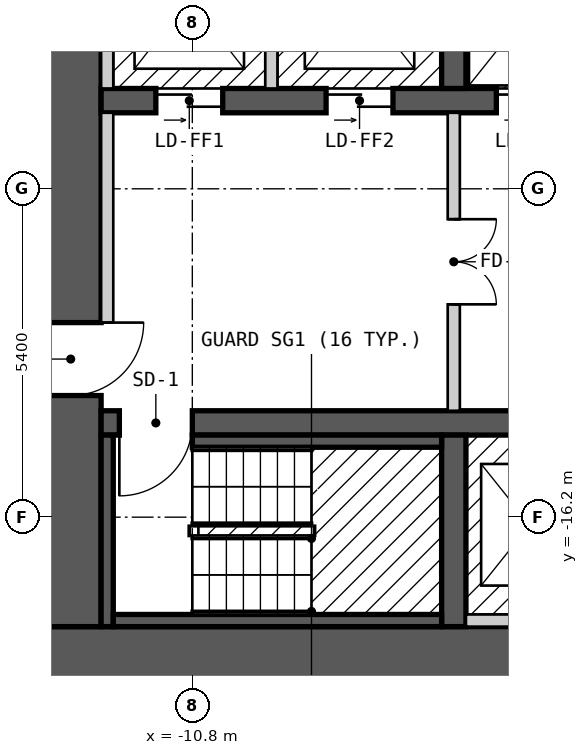
"""IFC4 building model, lengths in metres.
Left out: names, types, materials, properties, quantities, classifications, styles, units other than length and angle.
Written with IfcOpenShell. Run it as: python <this file> out.ifc"""

import sys

from ifc_helpers import new_model, si_unit, direction, frame, frame_2d, origin, place, context, subcontext, project, spatial, rectangle, extrude, element, fill, save


model = new_model("IFC4")
c1 = context("Model", 3, precision=1e-05, world=origin(), true_north=direction((0.0, 1.0)))
c2 = subcontext(c1, "Body", "Model", "MODEL_VIEW")
j1 = project(units=[si_unit("LENGTHUNIT", "METRE"), si_unit("PLANEANGLEUNIT", "RADIAN")], contexts=[c1])
p1 = place(None, origin())
s1 = spatial("IfcSite", under=j1, at=p1, CompositionType="ELEMENT")
p2 = place(p1, origin())
s2 = spatial("IfcBuilding", under=s1, at=p2, CompositionType="ELEMENT")
p3 = place(p2, frame((0.0, 0.0, 105.0)))
s3 = spatial("IfcBuildingStorey", under=s2, at=p3, CompositionType="ELEMENT", Elevation=105.0)
p4 = place(p3, frame((-13.3, -18.5, 0.0), z_axis=(0.0, 0.0, 1.0), x_axis=(1.0, 0.0, 0.0)))
e1 = element("IfcWall", 1, at=p4, inside=s3, PredefinedType="SHEAR", context=c2, shape_type="SweptSolid", body=[
    extrude(rectangle(XDim=26.6, YDim=1.0, at=frame_2d((13.3, 0.0))), origin(), (0.0, 0.0, 1.0), 2.6),
])
p5 = place(p3, frame((-12.8, -18.0, 0.0), z_axis=(0.0, 0.0, 1.0), x_axis=(0.0, 1.0, 0.0)))
e2 = element("IfcWall", 2, at=p5, inside=s3, PredefinedType="SHEAR", context=c2, shape_type="SweptSolid", body=[
    extrude(rectangle(XDim=12.0, YDim=1.0, at=frame_2d((6.0, 0.0))), origin(), (0.0, 0.0, 1.0), 2.6),
])
p6 = place(p5, frame((3.8, 0.0, 0.0)))
e3 = element("IfcOpeningElement", 3, at=p6, cuts=e2, PredefinedType="OPENING", context=c2, shape_type="SweptSolid", body=[
    extrude(rectangle(XDim=1.2, YDim=2.1, at=frame_2d((0.6, 1.05))), frame((0.0, 0.51, 0.0), z_axis=(0.0, -1.0, 0.0), x_axis=(1.0, 0.0, 0.0)), (0.0, 0.0, 1.0), 1.02),
])
p7 = place(p3, frame((-12.3, -14.65, 0.0), z_axis=(0.0, 0.0, 1.0), x_axis=(1.0, 0.0, 0.0)))
e4 = element("IfcWall", 4, at=p7, inside=s3, PredefinedType="SHEAR", context=c2, shape_type="SweptSolid", body=[
    extrude(rectangle(XDim=24.6, YDim=0.4, at=frame_2d((12.3, 0.0))), origin(), (0.0, 0.0, 1.0), 2.6),
])
p8 = place(p7, frame((1.5, 0.0, 0.0), z_axis=(0.0, 0.0, 1.0), x_axis=(-1.0, 0.0, 0.0)))
e5 = element("IfcOpeningElement", 5, at=p8, cuts=e4, PredefinedType="OPENING", context=c2, shape_type="SweptSolid", body=[
    extrude(rectangle(XDim=1.2, YDim=2.1, at=frame_2d((0.6, 1.05))), frame((0.0, 0.21, 0.0), z_axis=(0.0, -1.0, 0.0), x_axis=(1.0, 0.0, 0.0)), (0.0, 0.0, 1.0), 0.42),
])
p9 = place(p7, frame((24.35, 0.0, 0.0), z_axis=(0.0, 0.0, 1.0), x_axis=(-1.0, 0.0, 0.0)))
e6 = element("IfcOpeningElement", 6, at=p9, cuts=e4, PredefinedType="OPENING", context=c2, shape_type="SweptSolid", body=[
    extrude(rectangle(XDim=1.2, YDim=2.1, at=frame_2d((0.6, 1.05))), frame((0.0, 0.21, 0.0), z_axis=(0.0, -1.0, 0.0), x_axis=(1.0, 0.0, 0.0)), (0.0, 0.0, 1.0), 0.42),
])
p10 = place(p7, frame((17.4, 0.0, 0.0), z_axis=(0.0, 0.0, 1.0), x_axis=(-1.0, 0.0, 0.0)))
e7 = element("IfcOpeningElement", 7, at=p10, cuts=e4, PredefinedType="OPENING", context=c2, shape_type="SweptSolid", body=[
    extrude(rectangle(XDim=1.0, YDim=2.1, at=frame_2d((0.5, 1.05))), frame((0.0, 0.21, 0.0), z_axis=(0.0, -1.0, 0.0), x_axis=(1.0, 0.0, 0.0)), (0.0, 0.0, 1.0), 0.42),
])
p11 = place(p3, frame((-12.3, -9.35, 0.0), z_axis=(0.0, 0.0, 1.0), x_axis=(1.0, 0.0, 0.0)))
e8 = element("IfcWall", 8, at=p11, inside=s3, PredefinedType="SHEAR", context=c2, shape_type="SweptSolid", body=[
    extrude(rectangle(XDim=22.5, YDim=0.4, at=frame_2d((11.25, 0.0))), origin(), (0.0, 0.0, 1.0), 2.6),
])
p12 = place(p11, frame((0.9, 0.0, 0.0)))
e9 = element("IfcOpeningElement", 9, at=p12, cuts=e8, PredefinedType="OPENING", context=c2, shape_type="SweptSolid", body=[
    extrude(rectangle(XDim=1.1, YDim=2.1, at=frame_2d((0.55, 1.05))), frame((0.0, 0.21, 0.0), z_axis=(0.0, -1.0, 0.0), x_axis=(1.0, 0.0, 0.0)), (0.0, 0.0, 1.0), 0.42),
])
p13 = place(p11, frame((3.7, 0.0, 0.0)))
e10 = element("IfcOpeningElement", 10, at=p13, cuts=e8, PredefinedType="OPENING", context=c2, shape_type="SweptSolid", body=[
    extrude(rectangle(XDim=1.1, YDim=2.1, at=frame_2d((0.55, 1.05))), frame((0.0, 0.21, 0.0), z_axis=(0.0, -1.0, 0.0), x_axis=(1.0, 0.0, 0.0)), (0.0, 0.0, 1.0), 0.42),
])
p14 = place(p11, frame((6.5, 0.0, 0.0)))
e11 = element("IfcOpeningElement", 11, at=p14, cuts=e8, PredefinedType="OPENING", context=c2, shape_type="SweptSolid", body=[
    extrude(rectangle(XDim=1.1, YDim=2.1, at=frame_2d((0.55, 1.05))), frame((0.0, 0.21, 0.0), z_axis=(0.0, -1.0, 0.0), x_axis=(1.0, 0.0, 0.0)), (0.0, 0.0, 1.0), 0.42),
])
p15 = place(p11, frame((8.8, 0.0, 0.0)))
e12 = element("IfcOpeningElement", 12, at=p15, cuts=e8, PredefinedType="OPENING", context=c2, shape_type="SweptSolid", body=[
    extrude(rectangle(XDim=1.1, YDim=2.1, at=frame_2d((0.55, 1.05))), frame((0.0, 0.21, 0.0), z_axis=(0.0, -1.0, 0.0), x_axis=(1.0, 0.0, 0.0)), (0.0, 0.0, 1.0), 0.42),
])
p16 = place(p11, frame((11.1, 0.0, 0.0)))
e13 = element("IfcOpeningElement", 13, at=p16, cuts=e8, PredefinedType="OPENING", context=c2, shape_type="SweptSolid", body=[
    extrude(rectangle(XDim=1.1, YDim=2.1, at=frame_2d((0.55, 1.05))), frame((0.0, 0.21, 0.0), z_axis=(0.0, -1.0, 0.0), x_axis=(1.0, 0.0, 0.0)), (0.0, 0.0, 1.0), 0.42),
])
p17 = place(p11, frame((13.4, 0.0, 0.0)))
e14 = element("IfcOpeningElement", 14, at=p17, cuts=e8, PredefinedType="OPENING", context=c2, shape_type="SweptSolid", body=[
    extrude(rectangle(XDim=1.1, YDim=2.1, at=frame_2d((0.55, 1.05))), frame((0.0, 0.21, 0.0), z_axis=(0.0, -1.0, 0.0), x_axis=(1.0, 0.0, 0.0)), (0.0, 0.0, 1.0), 0.42),
])
p18 = place(p11, frame((15.7, 0.0, 0.0)))
e15 = element("IfcOpeningElement", 15, at=p18, cuts=e8, PredefinedType="OPENING", context=c2, shape_type="SweptSolid", body=[
    extrude(rectangle(XDim=1.1, YDim=2.1, at=frame_2d((0.55, 1.05))), frame((0.0, 0.21, 0.0), z_axis=(0.0, -1.0, 0.0), x_axis=(1.0, 0.0, 0.0)), (0.0, 0.0, 1.0), 0.42),
])
p19 = place(p11, frame((18.0, 0.0, 0.0)))
e16 = element("IfcOpeningElement", 16, at=p19, cuts=e8, PredefinedType="OPENING", context=c2, shape_type="SweptSolid", body=[
    extrude(rectangle(XDim=1.1, YDim=2.1, at=frame_2d((0.55, 1.05))), frame((0.0, 0.21, 0.0), z_axis=(0.0, -1.0, 0.0), x_axis=(1.0, 0.0, 0.0)), (0.0, 0.0, 1.0), 0.42),
])
p20 = place(p11, frame((20.4, 0.0, 0.0)))
e17 = element("IfcOpeningElement", 17, at=p20, cuts=e8, PredefinedType="OPENING", context=c2, shape_type="SweptSolid", body=[
    extrude(rectangle(XDim=1.1, YDim=2.1, at=frame_2d((0.55, 1.05))), frame((0.0, 0.21, 0.0), z_axis=(0.0, -1.0, 0.0), x_axis=(1.0, 0.0, 0.0)), (0.0, 0.0, 1.0), 0.42),
])
for number, where, z_axis, x_axis in (
    (18, (-6.5, -18.0, 0.0), (0.0, 0.0, 1.0), (0.0, 1.0, 0.0)),
    (19, (-6.5, -9.15, 0.0), (0.0, 0.0, 1.0), (0.0, 1.0, 0.0)),
):
    element("IfcWall", number, at=place(p3, frame(where, z_axis=z_axis, x_axis=x_axis)), inside=s3, PredefinedType="SHEAR", context=c2, shape_type="SweptSolid", body=[
        extrude(rectangle(XDim=3.15, YDim=0.4, at=frame_2d((1.575, 0.0))), origin(), (0.0, 0.0, 1.0), 2.6),
    ])
p21 = place(p3, frame((-12.2, -18.0, 0.0), z_axis=(0.0, 0.0, 1.0), x_axis=(0.0, 1.0, 0.0)))
e20 = element("IfcWall", 20, at=p21, inside=s3, PredefinedType="SOLIDWALL", context=c2, shape_type="SweptSolid", body=[
    extrude(rectangle(XDim=3.15, YDim=0.2, at=frame_2d((1.575, 0.0))), origin(), (0.0, 0.0, 1.0), 2.6),
])
p22 = place(p3, frame((-12.2, -13.0, 0.0), z_axis=(0.0, 0.0, 1.0), x_axis=(0.0, 1.0, 0.0)))
e21 = element("IfcWall", 21, at=p22, inside=s3, PredefinedType="PARTITIONING", context=c2, shape_type="SweptSolid", body=[
    extrude(rectangle(XDim=3.45, YDim=0.2, at=frame_2d((1.725, 0.0))), origin(), (0.0, 0.0, 1.0), 2.6),
])
p23 = place(p3, frame((-12.2, -9.15, 0.0), z_axis=(0.0, 0.0, 1.0), x_axis=(0.0, 1.0, 0.0)))
e22 = element("IfcWall", 22, at=p23, inside=s3, PredefinedType="SOLIDWALL", context=c2, shape_type="SweptSolid", body=[
    extrude(rectangle(XDim=3.15, YDim=0.2, at=frame_2d((1.575, 0.0))), origin(), (0.0, 0.0, 1.0), 2.6),
])
p24 = place(p3, frame((-12.1, -17.9, 0.0), z_axis=(0.0, 0.0, 1.0), x_axis=(1.0, 0.0, 0.0)))
e23 = element("IfcWall", 23, at=p24, inside=s3, PredefinedType="SOLIDWALL", context=c2, shape_type="SweptSolid", body=[
    extrude(rectangle(XDim=5.4, YDim=0.2, at=frame_2d((2.7, 0.0))), origin(), (0.0, 0.0, 1.0), 2.6),
])
p25 = place(p3, frame((-10.8, -14.95, 0.0), z_axis=(0.0, 0.0, 1.0), x_axis=(1.0, 0.0, 0.0)))
e24 = element("IfcWall", 24, at=p25, inside=s3, PredefinedType="SOLIDWALL", context=c2, shape_type="SweptSolid", body=[
    extrude(rectangle(XDim=4.1, YDim=0.2, at=frame_2d((2.05, 0.0))), origin(), (0.0, 0.0, 1.0), 2.6),
])
p26 = place(p3, frame((-9.5, -9.15, 0.0), z_axis=(0.0, 0.0, 1.0), x_axis=(0.0, 1.0, 0.0)))
e25 = element("IfcWall", 25, at=p26, inside=s3, PredefinedType="SOLIDWALL", context=c2, shape_type="SweptSolid", body=[
    extrude(rectangle(XDim=2.95, YDim=0.2, at=frame_2d((1.475, 0.0))), origin(), (0.0, 0.0, 1.0), 2.6),
])
p27 = place(p3, frame((-6.5, -14.45, 0.0), z_axis=(0.0, 0.0, 1.0), x_axis=(0.0, 1.0, 0.0)))
e26 = element("IfcWall", 26, at=p27, inside=s3, PredefinedType="PARTITIONING", context=c2, shape_type="SweptSolid", body=[
    extrude(rectangle(XDim=4.9, YDim=0.2, at=frame_2d((2.45, 0.0))), origin(), (0.0, 0.0, 1.0), 2.6),
])
p28 = place(p27, frame((3.15, 0.0, 0.0), z_axis=(0.0, 0.0, 1.0), x_axis=(-1.0, 0.0, 0.0)))
e27 = element("IfcOpeningElement", 27, at=p28, cuts=e26, PredefinedType="OPENING", context=c2, shape_type="SweptSolid", body=[
    extrude(rectangle(XDim=1.4, YDim=2.1, at=frame_2d((0.7, 1.05))), frame((0.0, 0.11, 0.0), z_axis=(0.0, -1.0, 0.0), x_axis=(1.0, 0.0, 0.0)), (0.0, 0.0, 1.0), 0.22),
])
p29 = place(p3, frame((-6.3, -17.9, 0.0), z_axis=(0.0, 0.0, 1.0), x_axis=(1.0, 0.0, 0.0)))
e28 = element("IfcWall", 28, at=p29, inside=s3, PredefinedType="SOLIDWALL", context=c2, shape_type="SweptSolid", body=[
    extrude(rectangle(XDim=12.6, YDim=0.2, at=frame_2d((6.3, 0.0))), origin(), (0.0, 0.0, 1.0), 2.6),
])
p30 = place(p12, origin())
e29 = element("IfcDoor", 29, at=p30, inside=s3, OperationType="DOUBLE_DOOR_SLIDING", PredefinedType="DOOR", context=c2, shape_type="SweptSolid", body=[
    extrude(rectangle(XDim=1.1, YDim=2.1, at=frame_2d((0.55, 1.05))), frame((0.0, 0.025, 0.0), z_axis=(0.0, -1.0, 0.0), x_axis=(1.0, 0.0, 0.0)), (0.0, 0.0, 1.0), 0.05),
])
fill(e9, e29)
p31 = place(p13, origin())
e30 = element("IfcDoor", 30, at=p31, inside=s3, OperationType="DOUBLE_DOOR_SLIDING", PredefinedType="DOOR", context=c2, shape_type="SweptSolid", body=[
    extrude(rectangle(XDim=1.1, YDim=2.1, at=frame_2d((0.55, 1.05))), frame((0.0, 0.025, 0.0), z_axis=(0.0, -1.0, 0.0), x_axis=(1.0, 0.0, 0.0)), (0.0, 0.0, 1.0), 0.05),
])
fill(e10, e30)
p32 = place(p14, origin())
e31 = element("IfcDoor", 31, at=p32, inside=s3, OperationType="DOUBLE_DOOR_SLIDING", PredefinedType="DOOR", context=c2, shape_type="SweptSolid", body=[
    extrude(rectangle(XDim=1.1, YDim=2.1, at=frame_2d((0.55, 1.05))), frame((0.0, 0.025, 0.0), z_axis=(0.0, -1.0, 0.0), x_axis=(1.0, 0.0, 0.0)), (0.0, 0.0, 1.0), 0.05),
])
fill(e11, e31)
p33 = place(p8, origin())
e32 = element("IfcDoor", 32, at=p33, inside=s3, OperationType="SINGLE_SWING_RIGHT", PredefinedType="DOOR", context=c2, shape_type="SweptSolid", body=[
    extrude(rectangle(XDim=1.2, YDim=2.1, at=frame_2d((0.6, 1.05))), frame((0.0, 0.025, 0.0), z_axis=(0.0, -1.0, 0.0), x_axis=(1.0, 0.0, 0.0)), (0.0, 0.0, 1.0), 0.05),
])
fill(e5, e32)
p34 = place(p6, origin())
e33 = element("IfcDoor", 33, at=p34, inside=s3, OperationType="SINGLE_SWING_RIGHT", PredefinedType="DOOR", context=c2, shape_type="SweptSolid", body=[
    extrude(rectangle(XDim=1.2, YDim=2.1, at=frame_2d((0.6, 1.05))), frame((0.0, 0.025, 0.0), z_axis=(0.0, -1.0, 0.0), x_axis=(1.0, 0.0, 0.0)), (0.0, 0.0, 1.0), 0.05),
])
fill(e3, e33)
p35 = place(p28, origin())
e34 = element("IfcDoor", 34, at=p35, inside=s3, OperationType="DOUBLE_DOOR_SINGLE_SWING", PredefinedType="DOOR", context=c2, shape_type="SweptSolid", body=[
    extrude(rectangle(XDim=1.4, YDim=2.1, at=frame_2d((0.7, 1.05))), frame((0.0, 0.025, 0.0), z_axis=(0.0, -1.0, 0.0), x_axis=(1.0, 0.0, 0.0)), (0.0, 0.0, 1.0), 0.05),
])
fill(e27, e34)
save(model, sys.argv[1])
